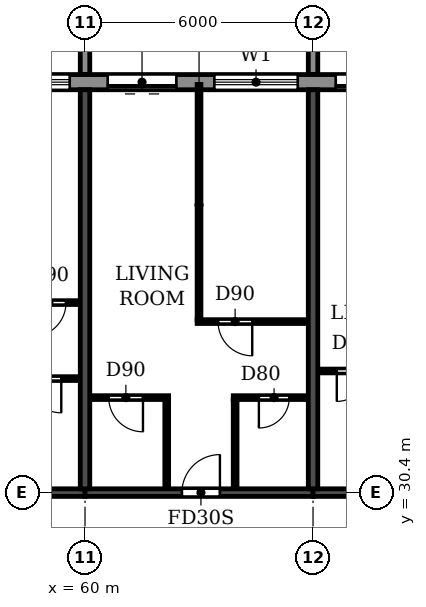
"""IFC4 building model, lengths in metres.
Left out: names, types, materials, properties, quantities, classifications, styles, units other than length and angle.
Written with IfcOpenShell. Run it as: python <this file> out.ifc"""

import sys

from ifc_helpers import new_model, si_unit, direction, frame, frame_2d, origin, place, context, subcontext, project, spatial, polyline, rectangle, outline, extrude, source, transform, mapped, element, fill, save


model = new_model("IFC4")
c1 = context("Model", 3, precision=1e-05, world=origin(), true_north=direction((0.0, 1.0)))
c2 = subcontext(c1, "Body", "Model", "MODEL_VIEW")
j1 = project(units=[si_unit("LENGTHUNIT", "METRE"), si_unit("PLANEANGLEUNIT", "RADIAN")], contexts=[c1])
p1 = place(None, origin())
s1 = spatial("IfcSite", under=j1, at=p1, CompositionType="ELEMENT")
p2 = place(p1, origin())
s2 = spatial("IfcBuilding", under=s1, at=p2, CompositionType="ELEMENT")
p3 = place(p2, frame((0.0, 0.0, 181.8)))
s3 = spatial("IfcBuildingStorey", under=s2, at=p3, CompositionType="ELEMENT", Elevation=181.8)
for number, where, z_axis, x_axis in (
    (1, (60.0, 30.5, 0.0), (0.0, 0.0, 1.0), (0.0, 1.0, 0.0)),
    (2, (66.0, 30.5, 0.0), (0.0, 0.0, 1.0), (0.0, 1.0, 0.0)),
):
    element("IfcWall", number, at=place(p3, frame(where, z_axis=z_axis, x_axis=x_axis)), inside=s3, PredefinedType="SHEAR", context=c2, shape_type="SweptSolid", body=[
        extrude(rectangle(XDim=10.5, YDim=0.25, at=frame_2d((5.25, 0.0))), origin(), (0.0, 0.0, 1.0), 3.08),
    ])
p4 = place(p3, frame((54.0, 30.4, 0.0), z_axis=(0.0, 0.0, 1.0), x_axis=(1.0, 0.0, 0.0)))
e3 = element("IfcWall", 3, at=p4, inside=s3, PredefinedType="SHEAR", context=c2, shape_type="SweptSolid", body=[
    extrude(rectangle(XDim=6.0, YDim=0.2, at=frame_2d((3.0, 0.0))), origin(), (0.0, 0.0, 1.0), 2.48),
])
p5 = place(p4, frame((2.45, 0.0, 0.0)))
e4 = element("IfcOpeningElement", 4, at=p5, cuts=e3, PredefinedType="OPENING", context=c2, shape_type="SweptSolid", body=[
    extrude(rectangle(XDim=1.0, YDim=2.1, at=frame_2d((0.5, 1.05))), frame((0.0, 0.11, 0.0), z_axis=(0.0, -1.0, 0.0), x_axis=(1.0, 0.0, 0.0)), (0.0, 0.0, 1.0), 0.22),
])
p6 = place(p3, frame((60.0, 30.4, 0.0), z_axis=(0.0, 0.0, 1.0), x_axis=(1.0, 0.0, 0.0)))
e5 = element("IfcWall", 5, at=p6, inside=s3, PredefinedType="SHEAR", context=c2, shape_type="SweptSolid", body=[
    extrude(rectangle(XDim=6.0, YDim=0.2, at=frame_2d((3.0, 0.0))), origin(), (0.0, 0.0, 1.0), 2.48),
])
p7 = place(p6, frame((2.55, 0.0, 0.0)))
e6 = element("IfcOpeningElement", 6, at=p7, cuts=e5, PredefinedType="OPENING", context=c2, shape_type="SweptSolid", body=[
    extrude(rectangle(XDim=1.0, YDim=2.1, at=frame_2d((0.5, 1.05))), frame((0.0, 0.11, 0.0), z_axis=(0.0, -1.0, 0.0), x_axis=(1.0, 0.0, 0.0)), (0.0, 0.0, 1.0), 0.22),
])
p8 = place(p3, frame((66.0, 30.4, 0.0), z_axis=(0.0, 0.0, 1.0), x_axis=(1.0, 0.0, 0.0)))
e7 = element("IfcWall", 7, at=p8, inside=s3, PredefinedType="SHEAR", context=c2, shape_type="SweptSolid", body=[
    extrude(rectangle(XDim=6.0, YDim=0.2, at=frame_2d((3.0, 0.0))), origin(), (0.0, 0.0, 1.0), 2.48),
])
p9 = place(p8, frame((2.45, 0.0, 0.0)))
e8 = element("IfcOpeningElement", 8, at=p9, cuts=e7, PredefinedType="OPENING", context=c2, shape_type="SweptSolid", body=[
    extrude(rectangle(XDim=1.0, YDim=2.1, at=frame_2d((0.5, 1.05))), frame((0.0, 0.11, 0.0), z_axis=(0.0, -1.0, 0.0), x_axis=(1.0, 0.0, 0.0)), (0.0, 0.0, 1.0), 0.22),
])
p10 = place(p3, frame((79.317, 41.2, 0.0), z_axis=(0.0, 0.0, 1.0), x_axis=(-1.0, 0.0, 0.0)))
e9 = element("IfcWall", 9, at=p10, inside=s3, PredefinedType="STANDARD", context=c2, shape_type="SweptSolid", body=[
    extrude(rectangle(XDim=56.634, YDim=0.4, at=frame_2d((28.317, 0.0))), origin(), (0.0, 0.0, 1.0), 3.08),
])
p11 = place(p10, frame((52.917, 0.0, 0.0)))
e10 = element("IfcOpeningElement", 10, at=p11, cuts=e9, PredefinedType="OPENING", context=c2, shape_type="SweptSolid", body=[
    extrude(rectangle(XDim=1.8, YDim=2.4, at=frame_2d((0.9, 1.2))), frame((0.0, 0.21, 0.0), z_axis=(0.0, -1.0, 0.0), x_axis=(1.0, 0.0, 0.0)), (0.0, 0.0, 1.0), 0.42),
])
p12 = place(p10, frame((49.717, 0.0, 0.9)))
e11 = element("IfcOpeningElement", 11, at=p12, cuts=e9, PredefinedType="OPENING", context=c2, shape_type="SweptSolid", body=[
    extrude(rectangle(XDim=2.2, YDim=1.5, at=frame_2d((1.1, 0.75))), frame((0.0, 0.21, 0.0), z_axis=(0.0, -1.0, 0.0), x_axis=(1.0, 0.0, 0.0)), (0.0, 0.0, 1.0), 0.42),
])
p13 = place(p10, frame((46.717, 0.0, 0.9)))
e12 = element("IfcOpeningElement", 12, at=p13, cuts=e9, PredefinedType="OPENING", context=c2, shape_type="SweptSolid", body=[
    extrude(rectangle(XDim=2.2, YDim=1.5, at=frame_2d((1.1, 0.75))), frame((0.0, 0.21, 0.0), z_axis=(0.0, -1.0, 0.0), x_axis=(1.0, 0.0, 0.0)), (0.0, 0.0, 1.0), 0.42),
])
p14 = place(p10, frame((43.917, 0.0, 0.0)))
e13 = element("IfcOpeningElement", 13, at=p14, cuts=e9, PredefinedType="OPENING", context=c2, shape_type="SweptSolid", body=[
    extrude(rectangle(XDim=1.8, YDim=2.4, at=frame_2d((0.9, 1.2))), frame((0.0, 0.21, 0.0), z_axis=(0.0, -1.0, 0.0), x_axis=(1.0, 0.0, 0.0)), (0.0, 0.0, 1.0), 0.42),
])
p15 = place(p10, frame((40.717, 0.0, 0.9)))
e14 = element("IfcOpeningElement", 14, at=p15, cuts=e9, PredefinedType="OPENING", context=c2, shape_type="SweptSolid", body=[
    extrude(rectangle(XDim=2.2, YDim=1.5, at=frame_2d((1.1, 0.75))), frame((0.0, 0.21, 0.0), z_axis=(0.0, -1.0, 0.0), x_axis=(1.0, 0.0, 0.0)), (0.0, 0.0, 1.0), 0.42),
])
p16 = place(p10, frame((37.717, 0.0, 0.9)))
e15 = element("IfcOpeningElement", 15, at=p16, cuts=e9, PredefinedType="OPENING", context=c2, shape_type="SweptSolid", body=[
    extrude(rectangle(XDim=2.2, YDim=1.5, at=frame_2d((1.1, 0.75))), frame((0.0, 0.21, 0.0), z_axis=(0.0, -1.0, 0.0), x_axis=(1.0, 0.0, 0.0)), (0.0, 0.0, 1.0), 0.42),
])
p17 = place(p10, frame((34.917, 0.0, 0.0)))
e16 = element("IfcOpeningElement", 16, at=p17, cuts=e9, PredefinedType="OPENING", context=c2, shape_type="SweptSolid", body=[
    extrude(rectangle(XDim=1.8, YDim=2.4, at=frame_2d((0.9, 1.2))), frame((0.0, 0.21, 0.0), z_axis=(0.0, -1.0, 0.0), x_axis=(1.0, 0.0, 0.0)), (0.0, 0.0, 1.0), 0.42),
])
p18 = place(p10, frame((31.717, 0.0, 0.9)))
e17 = element("IfcOpeningElement", 17, at=p18, cuts=e9, PredefinedType="OPENING", context=c2, shape_type="SweptSolid", body=[
    extrude(rectangle(XDim=2.2, YDim=1.5, at=frame_2d((1.1, 0.75))), frame((0.0, 0.21, 0.0), z_axis=(0.0, -1.0, 0.0), x_axis=(1.0, 0.0, 0.0)), (0.0, 0.0, 1.0), 0.42),
])
p19 = place(p10, frame((28.717, 0.0, 0.9)))
e18 = element("IfcOpeningElement", 18, at=p19, cuts=e9, PredefinedType="OPENING", context=c2, shape_type="SweptSolid", body=[
    extrude(rectangle(XDim=2.2, YDim=1.5, at=frame_2d((1.1, 0.75))), frame((0.0, 0.21, 0.0), z_axis=(0.0, -1.0, 0.0), x_axis=(1.0, 0.0, 0.0)), (0.0, 0.0, 1.0), 0.42),
])
p20 = place(p10, frame((25.717, 0.0, 0.9)))
e19 = element("IfcOpeningElement", 19, at=p20, cuts=e9, PredefinedType="OPENING", context=c2, shape_type="SweptSolid", body=[
    extrude(rectangle(XDim=2.2, YDim=1.5, at=frame_2d((1.1, 0.75))), frame((0.0, 0.21, 0.0), z_axis=(0.0, -1.0, 0.0), x_axis=(1.0, 0.0, 0.0)), (0.0, 0.0, 1.0), 0.42),
])
p21 = place(p10, frame((22.917, 0.0, 0.0)))
e20 = element("IfcOpeningElement", 20, at=p21, cuts=e9, PredefinedType="OPENING", context=c2, shape_type="SweptSolid", body=[
    extrude(rectangle(XDim=1.8, YDim=2.4, at=frame_2d((0.9, 1.2))), frame((0.0, 0.21, 0.0), z_axis=(0.0, -1.0, 0.0), x_axis=(1.0, 0.0, 0.0)), (0.0, 0.0, 1.0), 0.42),
])
p22 = place(p10, frame((19.717, 0.0, 0.9)))
e21 = element("IfcOpeningElement", 21, at=p22, cuts=e9, PredefinedType="OPENING", context=c2, shape_type="SweptSolid", body=[
    extrude(rectangle(XDim=2.2, YDim=1.5, at=frame_2d((1.1, 0.75))), frame((0.0, 0.21, 0.0), z_axis=(0.0, -1.0, 0.0), x_axis=(1.0, 0.0, 0.0)), (0.0, 0.0, 1.0), 0.42),
])
p23 = place(p10, frame((16.917, 0.0, 0.0)))
e22 = element("IfcOpeningElement", 22, at=p23, cuts=e9, PredefinedType="OPENING", context=c2, shape_type="SweptSolid", body=[
    extrude(rectangle(XDim=1.8, YDim=2.4, at=frame_2d((0.9, 1.2))), frame((0.0, 0.21, 0.0), z_axis=(0.0, -1.0, 0.0), x_axis=(1.0, 0.0, 0.0)), (0.0, 0.0, 1.0), 0.42),
])
p24 = place(p10, frame((13.717, 0.0, 0.9)))
e23 = element("IfcOpeningElement", 23, at=p24, cuts=e9, PredefinedType="OPENING", context=c2, shape_type="SweptSolid", body=[
    extrude(rectangle(XDim=2.2, YDim=1.5, at=frame_2d((1.1, 0.75))), frame((0.0, 0.21, 0.0), z_axis=(0.0, -1.0, 0.0), x_axis=(1.0, 0.0, 0.0)), (0.0, 0.0, 1.0), 0.42),
])
p25 = place(p10, frame((10.917, 0.0, 0.0)))
e24 = element("IfcOpeningElement", 24, at=p25, cuts=e9, PredefinedType="OPENING", context=c2, shape_type="SweptSolid", body=[
    extrude(rectangle(XDim=1.8, YDim=2.4, at=frame_2d((0.9, 1.2))), frame((0.0, 0.21, 0.0), z_axis=(0.0, -1.0, 0.0), x_axis=(1.0, 0.0, 0.0)), (0.0, 0.0, 1.0), 0.42),
])
p26 = place(p10, frame((7.717, 0.0, 0.9)))
e25 = element("IfcOpeningElement", 25, at=p26, cuts=e9, PredefinedType="OPENING", context=c2, shape_type="SweptSolid", body=[
    extrude(rectangle(XDim=2.2, YDim=1.5, at=frame_2d((1.1, 0.75))), frame((0.0, 0.21, 0.0), z_axis=(0.0, -1.0, 0.0), x_axis=(1.0, 0.0, 0.0)), (0.0, 0.0, 1.0), 0.42),
])
p27 = place(p10, frame((4.717, 0.0, 0.9)))
e26 = element("IfcOpeningElement", 26, at=p27, cuts=e9, PredefinedType="OPENING", context=c2, shape_type="SweptSolid", body=[
    extrude(rectangle(XDim=2.2, YDim=1.5, at=frame_2d((1.1, 0.75))), frame((0.0, 0.21, 0.0), z_axis=(0.0, -1.0, 0.0), x_axis=(1.0, 0.0, 0.0)), (0.0, 0.0, 1.0), 0.42),
])
p28 = place(p10, frame((1.917, 0.0, 0.0)))
e27 = element("IfcOpeningElement", 27, at=p28, cuts=e9, PredefinedType="OPENING", context=c2, shape_type="SweptSolid", body=[
    extrude(rectangle(XDim=1.8, YDim=2.4, at=frame_2d((0.9, 1.2))), frame((0.0, 0.21, 0.0), z_axis=(0.0, -1.0, 0.0), x_axis=(1.0, 0.0, 0.0)), (0.0, 0.0, 1.0), 0.42),
])
m1 = source(origin(), c2, "Body", "SweptSolid", [
    extrude(outline(polyline([(0.0, 0.0), (0.25, 0.0), (0.25, 3.1), (0.0, 3.1), (0.0, 0.0)])), origin(), (0.0, 0.0, 1.0), 3.1),
])
for number, where in (
    (28, (59.875, 41.4, 0.0)),
    (29, (65.875, 41.4, 0.0)),
):
    element("IfcWall", number, at=place(p3, frame(where)), inside=s3, PredefinedType="STANDARD", context=c2, shape_type="MappedRepresentation", body=[
        mapped(m1, transform((0.0, 0.0, 0.0))),
    ])
p29 = place(p3, frame((60.135, 32.9, 0.0), z_axis=(0.0, 0.0, 1.0), x_axis=(1.0, 0.0, 0.0)))
e30 = element("IfcWall", 30, at=p29, inside=s3, PredefinedType="PARTITIONING", context=c2, shape_type="SweptSolid", body=[
    extrude(rectangle(XDim=2.065, YDim=0.1, at=frame_2d((1.032, 0.0))), origin(), (0.0, 0.0, 1.0), 3.08),
])
p30 = place(p29, frame((0.49, 0.0, 0.0)))
e31 = element("IfcOpeningElement", 31, at=p30, cuts=e30, PredefinedType="OPENING", context=c2, shape_type="SweptSolid", body=[
    extrude(rectangle(XDim=0.9, YDim=2.1, at=frame_2d((0.45, 1.05))), frame((0.0, 0.06, 0.0), z_axis=(0.0, -1.0, 0.0), x_axis=(1.0, 0.0, 0.0)), (0.0, 0.0, 1.0), 0.12),
])
p31 = place(p3, frame((63.9, 32.9, 0.0), z_axis=(0.0, 0.0, 1.0), x_axis=(1.0, 0.0, 0.0)))
e32 = element("IfcWall", 32, at=p31, inside=s3, PredefinedType="PARTITIONING", context=c2, shape_type="SweptSolid", body=[
    extrude(rectangle(XDim=1.965, YDim=0.1, at=frame_2d((0.982, 0.0))), origin(), (0.0, 0.0, 1.0), 3.08),
])
p32 = place(p31, frame((0.675, 0.0, 0.0)))
e33 = element("IfcOpeningElement", 33, at=p32, cuts=e32, PredefinedType="OPENING", context=c2, shape_type="SweptSolid", body=[
    extrude(rectangle(XDim=0.8, YDim=2.1, at=frame_2d((0.4, 1.05))), frame((0.0, 0.06, 0.0), z_axis=(0.0, -1.0, 0.0), x_axis=(1.0, 0.0, 0.0)), (0.0, 0.0, 1.0), 0.12),
])
p33 = place(p3, frame((57.8, 33.4, 0.0), z_axis=(0.0, 0.0, 1.0), x_axis=(1.0, 0.0, 0.0)))
e34 = element("IfcWall", 34, at=p33, inside=s3, PredefinedType="PARTITIONING", context=c2, shape_type="SweptSolid", body=[
    extrude(rectangle(XDim=2.065, YDim=0.1, at=frame_2d((1.032, 0.0))), origin(), (0.0, 0.0, 1.0), 3.08),
])
p34 = place(p33, frame((0.675, 0.0, 0.0)))
e35 = element("IfcOpeningElement", 35, at=p34, cuts=e34, PredefinedType="OPENING", context=c2, shape_type="SweptSolid", body=[
    extrude(rectangle(XDim=0.9, YDim=2.1, at=frame_2d((0.45, 1.05))), frame((0.0, 0.06, 0.0), z_axis=(0.0, -1.0, 0.0), x_axis=(1.0, 0.0, 0.0)), (0.0, 0.0, 1.0), 0.12),
])
p35 = place(p3, frame((66.135, 33.6, 0.0), z_axis=(0.0, 0.0, 1.0), x_axis=(1.0, 0.0, 0.0)))
e36 = element("IfcWall", 36, at=p35, inside=s3, PredefinedType="PARTITIONING", context=c2, shape_type="SweptSolid", body=[
    extrude(rectangle(XDim=1.965, YDim=0.1, at=frame_2d((0.982, 0.0))), origin(), (0.0, 0.0, 1.0), 3.08),
])
p36 = place(p35, frame((0.49, 0.0, 0.0)))
e37 = element("IfcOpeningElement", 37, at=p36, cuts=e36, PredefinedType="OPENING", context=c2, shape_type="SweptSolid", body=[
    extrude(rectangle(XDim=0.8, YDim=2.1, at=frame_2d((0.4, 1.05))), frame((0.0, 0.06, 0.0), z_axis=(0.0, -1.0, 0.0), x_axis=(1.0, 0.0, 0.0)), (0.0, 0.0, 1.0), 0.12),
])
p37 = place(p3, frame((62.95, 34.9, 0.0), z_axis=(0.0, 0.0, 1.0), x_axis=(1.0, 0.0, 0.0)))
e38 = element("IfcWall", 38, at=p37, inside=s3, PredefinedType="PARTITIONING", context=c2, shape_type="SweptSolid", body=[
    extrude(rectangle(XDim=2.915, YDim=0.1, at=frame_2d((1.458, 0.0))), origin(), (0.0, 0.0, 1.0), 3.08),
])
p38 = place(p37, frame((0.55, 0.0, 0.0)))
e39 = element("IfcOpeningElement", 39, at=p38, cuts=e38, PredefinedType="OPENING", context=c2, shape_type="SweptSolid", body=[
    extrude(rectangle(XDim=0.9, YDim=2.1, at=frame_2d((0.45, 1.05))), frame((0.0, 0.06, 0.0), z_axis=(0.0, -1.0, 0.0), x_axis=(1.0, 0.0, 0.0)), (0.0, 0.0, 1.0), 0.12),
])
p39 = place(p3, frame((56.95, 35.4, 0.0), z_axis=(0.0, 0.0, 1.0), x_axis=(1.0, 0.0, 0.0)))
e40 = element("IfcWall", 40, at=p39, inside=s3, PredefinedType="PARTITIONING", context=c2, shape_type="SweptSolid", body=[
    extrude(rectangle(XDim=2.915, YDim=0.1, at=frame_2d((1.458, 0.0))), origin(), (0.0, 0.0, 1.0), 3.08),
])
p40 = place(p39, frame((1.65, 0.0, 0.0)))
e41 = element("IfcOpeningElement", 41, at=p40, cuts=e40, PredefinedType="OPENING", context=c2, shape_type="SweptSolid", body=[
    extrude(rectangle(XDim=0.9, YDim=2.1, at=frame_2d((0.45, 1.05))), frame((0.0, 0.06, 0.0), z_axis=(0.0, -1.0, 0.0), x_axis=(1.0, 0.0, 0.0)), (0.0, 0.0, 1.0), 0.12),
])
p41 = place(p3, frame((62.15, 30.51, 0.0), z_axis=(0.0, 0.0, 1.0), x_axis=(0.0, 1.0, 0.0)))
e42 = element("IfcWall", 42, at=p41, inside=s3, PredefinedType="PARTITIONING", context=c2, shape_type="SweptSolid", body=[
    extrude(rectangle(XDim=2.34, YDim=0.1, at=frame_2d((1.17, 0.0))), origin(), (0.0, 0.0, 1.0), 3.08),
])
p42 = place(p3, frame((63.0, 34.95, 0.0), z_axis=(0.0, 0.0, 1.0), x_axis=(0.0, 1.0, 0.0)))
e43 = element("IfcWall", 43, at=p42, inside=s3, PredefinedType="PARTITIONING", context=c2, shape_type="SweptSolid", body=[
    extrude(rectangle(XDim=6.19, YDim=0.1, at=frame_2d((3.095, 0.0))), origin(), (0.0, 0.0, 1.0), 3.08),
])
p43 = place(p3, frame((63.95, 30.51, 0.0), z_axis=(0.0, 0.0, 1.0), x_axis=(0.0, 1.0, 0.0)))
e44 = element("IfcWall", 44, at=p43, inside=s3, PredefinedType="PARTITIONING", context=c2, shape_type="SweptSolid", body=[
    extrude(rectangle(XDim=2.34, YDim=0.1, at=frame_2d((1.17, 0.0))), origin(), (0.0, 0.0, 1.0), 3.08),
])
p44 = place(p22, origin())
e45 = element("IfcWindow", 45, at=p44, inside=s3, PartitioningType="DOUBLE_PANEL_HORIZONTAL", PredefinedType="WINDOW", context=c2, shape_type="SweptSolid", body=[
    extrude(rectangle(XDim=2.2, YDim=1.5, at=frame_2d((1.1, 0.75))), frame((0.0, 0.03, 0.0), z_axis=(0.0, -1.0, 0.0), x_axis=(1.0, 0.0, 0.0)), (0.0, 0.0, 1.0), 0.06),
])
fill(e21, e45)
p45 = place(p23, origin())
e46 = element("IfcDoor", 46, at=p45, inside=s3, OperationType="DOUBLE_DOOR_SLIDING", PredefinedType="DOOR", context=c2, shape_type="SweptSolid", body=[
    extrude(rectangle(XDim=1.8, YDim=2.4, at=frame_2d((0.9, 1.2))), frame((0.0, 0.025, 0.0), z_axis=(0.0, -1.0, 0.0), x_axis=(1.0, 0.0, 0.0)), (0.0, 0.0, 1.0), 0.05),
])
fill(e22, e46)
p46 = place(p24, origin())
e47 = element("IfcWindow", 47, at=p46, inside=s3, PartitioningType="DOUBLE_PANEL_HORIZONTAL", PredefinedType="WINDOW", context=c2, shape_type="SweptSolid", body=[
    extrude(rectangle(XDim=2.2, YDim=1.5, at=frame_2d((1.1, 0.75))), frame((0.0, 0.03, 0.0), z_axis=(0.0, -1.0, 0.0), x_axis=(1.0, 0.0, 0.0)), (0.0, 0.0, 1.0), 0.06),
])
fill(e23, e47)
p47 = place(p25, origin())
e48 = element("IfcDoor", 48, at=p47, inside=s3, OperationType="DOUBLE_DOOR_SLIDING", PredefinedType="DOOR", context=c2, shape_type="SweptSolid", body=[
    extrude(rectangle(XDim=1.8, YDim=2.4, at=frame_2d((0.9, 1.2))), frame((0.0, 0.025, 0.0), z_axis=(0.0, -1.0, 0.0), x_axis=(1.0, 0.0, 0.0)), (0.0, 0.0, 1.0), 0.05),
])
fill(e24, e48)
p48 = place(p34, frame((0.9, 0.0, 0.0), z_axis=(0.0, 0.0, 1.0), x_axis=(-1.0, 0.0, 0.0)))
e49 = element("IfcDoor", 49, at=p48, inside=s3, OperationType="SINGLE_SWING_LEFT", PredefinedType="DOOR", context=c2, shape_type="SweptSolid", body=[
    extrude(rectangle(XDim=0.9, YDim=2.1, at=frame_2d((0.45, 1.05))), frame((0.0, 0.025, 0.0), z_axis=(0.0, -1.0, 0.0), x_axis=(1.0, 0.0, 0.0)), (0.0, 0.0, 1.0), 0.05),
])
fill(e35, e49)
p49 = place(p40, frame((0.9, 0.0, 0.0), z_axis=(0.0, 0.0, 1.0), x_axis=(-1.0, 0.0, 0.0)))
e50 = element("IfcDoor", 50, at=p49, inside=s3, OperationType="SINGLE_SWING_RIGHT", PredefinedType="DOOR", context=c2, shape_type="SweptSolid", body=[
    extrude(rectangle(XDim=0.9, YDim=2.1, at=frame_2d((0.45, 1.05))), frame((0.0, 0.025, 0.0), z_axis=(0.0, -1.0, 0.0), x_axis=(1.0, 0.0, 0.0)), (0.0, 0.0, 1.0), 0.05),
])
fill(e41, e50)
p50 = place(p30, frame((0.9, 0.0, 0.0), z_axis=(0.0, 0.0, 1.0), x_axis=(-1.0, 0.0, 0.0)))
e51 = element("IfcDoor", 51, at=p50, inside=s3, OperationType="SINGLE_SWING_LEFT", PredefinedType="DOOR", context=c2, shape_type="SweptSolid", body=[
    extrude(rectangle(XDim=0.9, YDim=2.1, at=frame_2d((0.45, 1.05))), frame((0.0, 0.025, 0.0), z_axis=(0.0, -1.0, 0.0), x_axis=(1.0, 0.0, 0.0)), (0.0, 0.0, 1.0), 0.05),
])
fill(e31, e51)
p51 = place(p7, origin())
e52 = element("IfcDoor", 52, at=p51, inside=s3, OperationType="SINGLE_SWING_RIGHT", PredefinedType="DOOR", context=c2, shape_type="SweptSolid", body=[
    extrude(rectangle(XDim=1.0, YDim=2.1, at=frame_2d((0.5, 1.05))), frame((0.0, 0.025, 0.0), z_axis=(0.0, -1.0, 0.0), x_axis=(1.0, 0.0, 0.0)), (0.0, 0.0, 1.0), 0.05),
])
fill(e6, e52)
p52 = place(p38, frame((0.9, 0.0, 0.0), z_axis=(0.0, 0.0, 1.0), x_axis=(-1.0, 0.0, 0.0)))
e53 = element("IfcDoor", 53, at=p52, inside=s3, OperationType="SINGLE_SWING_LEFT", PredefinedType="DOOR", context=c2, shape_type="SweptSolid", body=[
    extrude(rectangle(XDim=0.9, YDim=2.1, at=frame_2d((0.45, 1.05))), frame((0.0, 0.025, 0.0), z_axis=(0.0, -1.0, 0.0), x_axis=(1.0, 0.0, 0.0)), (0.0, 0.0, 1.0), 0.05),
])
fill(e39, e53)
p53 = place(p32, frame((0.8, 0.0, 0.0), z_axis=(0.0, 0.0, 1.0), x_axis=(-1.0, 0.0, 0.0)))
e54 = element("IfcDoor", 54, at=p53, inside=s3, OperationType="SINGLE_SWING_RIGHT", PredefinedType="DOOR", context=c2, shape_type="SweptSolid", body=[
    extrude(rectangle(XDim=0.8, YDim=2.1, at=frame_2d((0.4, 1.05))), frame((0.0, 0.025, 0.0), z_axis=(0.0, -1.0, 0.0), x_axis=(1.0, 0.0, 0.0)), (0.0, 0.0, 1.0), 0.05),
])
fill(e33, e54)
p54 = place(p36, frame((0.8, 0.0, 0.0), z_axis=(0.0, 0.0, 1.0), x_axis=(-1.0, 0.0, 0.0)))
e55 = element("IfcDoor", 55, at=p54, inside=s3, OperationType="SINGLE_SWING_RIGHT", PredefinedType="DOOR", context=c2, shape_type="SweptSolid", body=[
    extrude(rectangle(XDim=0.8, YDim=2.1, at=frame_2d((0.4, 1.05))), frame((0.0, 0.025, 0.0), z_axis=(0.0, -1.0, 0.0), x_axis=(1.0, 0.0, 0.0)), (0.0, 0.0, 1.0), 0.05),
])
fill(e37, e55)
save(model, sys.argv[1])
